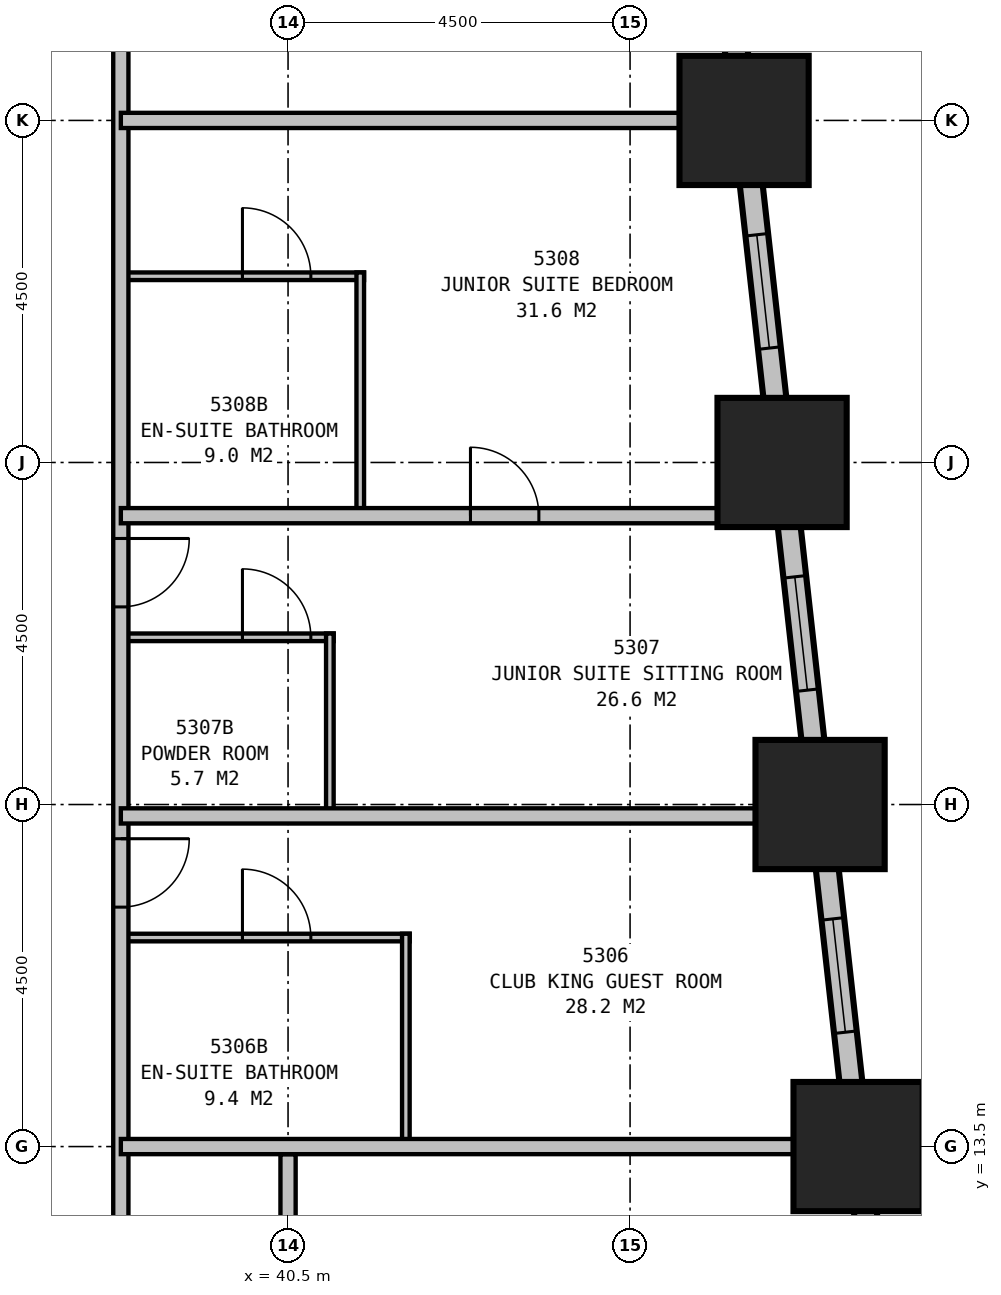
"""IFC4 building model, lengths in metres.
Left out: names, types, materials, properties, quantities, classifications, styles, units other than length and angle.
Written with IfcOpenShell. Run it as: python <this file> out.ifc"""

import sys

from ifc_helpers import new_model, si_unit, direction, frame, frame_2d, origin, origin_2d, place, context, subcontext, project, spatial, rectangle, extrude, element, fill, save


model = new_model("IFC4")
c1 = context("Model", 3, precision=1e-05, world=origin(), true_north=direction((0.0, 1.0)))
c2 = subcontext(c1, "Body", "Model", "MODEL_VIEW")
j1 = project(units=[si_unit("LENGTHUNIT", "METRE"), si_unit("PLANEANGLEUNIT", "RADIAN")], contexts=[c1])
p1 = place(None, origin())
s1 = spatial("IfcSite", under=j1, at=p1, CompositionType="ELEMENT")
p2 = place(p1, origin())
s2 = spatial("IfcBuilding", under=s1, at=p2, CompositionType="ELEMENT")
p3 = place(p2, frame((0.0, 0.0, 204.4)))
s3 = spatial("IfcBuildingStorey", under=s2, at=p3, CompositionType="ELEMENT", Elevation=204.4)
for number, where, z_axis, x_axis in (
    (1, (48.0, 13.5, 0.0), (0.0, 0.0, 1.0), (1.0, 0.0, 0.0)),
    (2, (47.5, 18.0, 0.0), (0.0, 0.0, 1.0), (1.0, 0.0, 0.0)),
    (3, (47.0, 22.5, 0.0), (0.0, 0.0, 1.0), (1.0, 0.0, 0.0)),
    (4, (46.5, 27.0, 0.0), (0.0, 0.0, 1.0), (1.0, 0.0, 0.0)),
):
    element("IfcColumn", number, at=place(p3, frame(where, z_axis=z_axis, x_axis=x_axis)), inside=s3, PredefinedType="COLUMN", context=c2, shape_type="SweptSolid", body=[
        extrude(rectangle(XDim=1.7, YDim=1.7, at=origin_2d()), origin(), (0.0, 0.0, 1.0), 3.5),
    ])
p4 = place(p3, frame((49.017, 4.351, 0.0), z_axis=(0.0, 0.0, 1.0), x_axis=(-0.110433201132, 0.993883548555, 0.0)))
e5 = element("IfcWall", 5, at=p4, inside=s3, PredefinedType="STANDARD", context=c2, shape_type="SweptSolid", body=[
    extrude(rectangle(XDim=31.994, YDim=0.3, at=frame_2d((15.997, 0.0))), origin(), (0.0, 0.0, 1.0), 2.25),
])
p5 = place(p4, frame((1.664, 0.0, 0.5)))
e6 = element("IfcOpeningElement", 6, at=p5, cuts=e5, PredefinedType="OPENING", context=c2, shape_type="SweptSolid", body=[
    extrude(rectangle(XDim=1.5, YDim=1.6, at=frame_2d((0.75, 0.8))), frame((0.0, 0.16, 0.0), z_axis=(0.0, -1.0, 0.0), x_axis=(1.0, 0.0, 0.0)), (0.0, 0.0, 1.0), 0.32),
])
p6 = place(p4, frame((6.192, 0.0, 0.5)))
e7 = element("IfcOpeningElement", 7, at=p6, cuts=e5, PredefinedType="OPENING", context=c2, shape_type="SweptSolid", body=[
    extrude(rectangle(XDim=1.5, YDim=1.6, at=frame_2d((0.75, 0.8))), frame((0.0, 0.16, 0.0), z_axis=(0.0, -1.0, 0.0), x_axis=(1.0, 0.0, 0.0)), (0.0, 0.0, 1.0), 0.32),
])
p7 = place(p4, frame((10.719, 0.0, 0.5)))
e8 = element("IfcOpeningElement", 8, at=p7, cuts=e5, PredefinedType="OPENING", context=c2, shape_type="SweptSolid", body=[
    extrude(rectangle(XDim=1.5, YDim=1.6, at=frame_2d((0.75, 0.8))), frame((0.0, 0.16, 0.0), z_axis=(0.0, -1.0, 0.0), x_axis=(1.0, 0.0, 0.0)), (0.0, 0.0, 1.0), 0.32),
])
p8 = place(p4, frame((15.247, 0.0, 0.5)))
e9 = element("IfcOpeningElement", 9, at=p8, cuts=e5, PredefinedType="OPENING", context=c2, shape_type="SweptSolid", body=[
    extrude(rectangle(XDim=1.5, YDim=1.6, at=frame_2d((0.75, 0.8))), frame((0.0, 0.16, 0.0), z_axis=(0.0, -1.0, 0.0), x_axis=(1.0, 0.0, 0.0)), (0.0, 0.0, 1.0), 0.32),
])
p9 = place(p4, frame((19.775, 0.0, 0.5)))
e10 = element("IfcOpeningElement", 10, at=p9, cuts=e5, PredefinedType="OPENING", context=c2, shape_type="SweptSolid", body=[
    extrude(rectangle(XDim=1.5, YDim=1.6, at=frame_2d((0.75, 0.8))), frame((0.0, 0.16, 0.0), z_axis=(0.0, -1.0, 0.0), x_axis=(1.0, 0.0, 0.0)), (0.0, 0.0, 1.0), 0.32),
])
p10 = place(p4, frame((24.302, 0.0, 0.5)))
e11 = element("IfcOpeningElement", 11, at=p10, cuts=e5, PredefinedType="OPENING", context=c2, shape_type="SweptSolid", body=[
    extrude(rectangle(XDim=1.5, YDim=1.6, at=frame_2d((0.75, 0.8))), frame((0.0, 0.16, 0.0), z_axis=(0.0, -1.0, 0.0), x_axis=(1.0, 0.0, 0.0)), (0.0, 0.0, 1.0), 0.32),
])
p11 = place(p4, frame((28.83, 0.0, 0.5)))
e12 = element("IfcOpeningElement", 12, at=p11, cuts=e5, PredefinedType="OPENING", context=c2, shape_type="SweptSolid", body=[
    extrude(rectangle(XDim=1.5, YDim=1.6, at=frame_2d((0.75, 0.8))), frame((0.0, 0.16, 0.0), z_axis=(0.0, -1.0, 0.0), x_axis=(1.0, 0.0, 0.0)), (0.0, 0.0, 1.0), 0.32),
])
p12 = place(p3, frame((38.3, 10.6, 0.0), z_axis=(0.0, 0.0, 1.0), x_axis=(0.0, 1.0, 0.0)))
e13 = element("IfcWall", 13, at=p12, inside=s3, PredefinedType="PARTITIONING", context=c2, shape_type="SweptSolid", body=[
    extrude(rectangle(XDim=18.7, YDim=0.2, at=frame_2d((9.35, 0.0))), origin(), (0.0, 0.0, 1.0), 3.25),
])
p13 = place(p12, frame((6.95, 0.0, 0.0), z_axis=(0.0, 0.0, 1.0), x_axis=(-1.0, 0.0, 0.0)))
e14 = element("IfcOpeningElement", 14, at=p13, cuts=e13, PredefinedType="OPENING", context=c2, shape_type="SweptSolid", body=[
    extrude(rectangle(XDim=0.9, YDim=2.1, at=frame_2d((0.45, 1.05))), frame((0.0, 0.11, 0.0), z_axis=(0.0, -1.0, 0.0), x_axis=(1.0, 0.0, 0.0)), (0.0, 0.0, 1.0), 0.22),
])
p14 = place(p12, frame((10.9, 0.0, 0.0), z_axis=(0.0, 0.0, 1.0), x_axis=(-1.0, 0.0, 0.0)))
e15 = element("IfcOpeningElement", 15, at=p14, cuts=e13, PredefinedType="OPENING", context=c2, shape_type="SweptSolid", body=[
    extrude(rectangle(XDim=0.9, YDim=2.1, at=frame_2d((0.45, 1.05))), frame((0.0, 0.11, 0.0), z_axis=(0.0, -1.0, 0.0), x_axis=(1.0, 0.0, 0.0)), (0.0, 0.0, 1.0), 0.22),
])
p15 = place(p3, frame((38.3, 17.85, 0.0), z_axis=(0.0, 0.0, 1.0), x_axis=(1.0, 0.0, 0.0)))
e16 = element("IfcWall", 16, at=p15, inside=s3, PredefinedType="PARTITIONING", context=c2, shape_type="SweptSolid", body=[
    extrude(rectangle(XDim=9.216, YDim=0.2, at=frame_2d((4.608, 0.0))), origin(), (0.0, 0.0, 1.0), 2.25),
])
p16 = place(p3, frame((38.3, 21.8, 0.0), z_axis=(0.0, 0.0, 1.0), x_axis=(1.0, 0.0, 0.0)))
e17 = element("IfcWall", 17, at=p16, inside=s3, PredefinedType="PARTITIONING", context=c2, shape_type="SweptSolid", body=[
    extrude(rectangle(XDim=8.777, YDim=0.2, at=frame_2d((4.388, 0.0))), origin(), (0.0, 0.0, 1.0), 3.25),
])
p17 = place(p16, frame((4.6, 0.0, 0.0)))
e18 = element("IfcOpeningElement", 18, at=p17, cuts=e17, PredefinedType="OPENING", context=c2, shape_type="SweptSolid", body=[
    extrude(rectangle(XDim=0.9, YDim=2.1, at=frame_2d((0.45, 1.05))), frame((0.0, 0.11, 0.0), z_axis=(0.0, -1.0, 0.0), x_axis=(1.0, 0.0, 0.0)), (0.0, 0.0, 1.0), 0.22),
])
p18 = place(p3, frame((42.05, 13.5, 0.0), z_axis=(0.0, 0.0, 1.0), x_axis=(0.0, 1.0, 0.0)))
e19 = element("IfcWall", 19, at=p18, inside=s3, PredefinedType="PLUMBINGWALL", context=c2, shape_type="SweptSolid", body=[
    extrude(rectangle(XDim=2.8, YDim=0.1, at=frame_2d((1.4, 0.0))), origin(), (0.0, 0.0, 1.0), 3.25),
])
p19 = place(p3, frame((38.3, 16.25, 0.0), z_axis=(0.0, 0.0, 1.0), x_axis=(1.0, 0.0, 0.0)))
e20 = element("IfcWall", 20, at=p19, inside=s3, PredefinedType="PLUMBINGWALL", context=c2, shape_type="SweptSolid", body=[
    extrude(rectangle(XDim=3.8, YDim=0.1, at=frame_2d((1.9, 0.0))), origin(), (0.0, 0.0, 1.0), 3.25),
])
p20 = place(p19, frame((1.6, 0.0, 0.0)))
e21 = element("IfcOpeningElement", 21, at=p20, cuts=e20, PredefinedType="OPENING", context=c2, shape_type="SweptSolid", body=[
    extrude(rectangle(XDim=0.9, YDim=2.1, at=frame_2d((0.45, 1.05))), frame((0.0, 0.06, 0.0), z_axis=(0.0, -1.0, 0.0), x_axis=(1.0, 0.0, 0.0)), (0.0, 0.0, 1.0), 0.12),
])
p21 = place(p3, frame((41.05, 17.85, 0.0), z_axis=(0.0, 0.0, 1.0), x_axis=(0.0, 1.0, 0.0)))
e22 = element("IfcWall", 22, at=p21, inside=s3, PredefinedType="PLUMBINGWALL", context=c2, shape_type="SweptSolid", body=[
    extrude(rectangle(XDim=2.4, YDim=0.1, at=frame_2d((1.2, 0.0))), origin(), (0.0, 0.0, 1.0), 3.25),
])
p22 = place(p3, frame((38.3, 20.2, 0.0), z_axis=(0.0, 0.0, 1.0), x_axis=(1.0, 0.0, 0.0)))
e23 = element("IfcWall", 23, at=p22, inside=s3, PredefinedType="PLUMBINGWALL", context=c2, shape_type="SweptSolid", body=[
    extrude(rectangle(XDim=2.8, YDim=0.1, at=frame_2d((1.4, 0.0))), origin(), (0.0, 0.0, 1.0), 3.25),
])
p23 = place(p22, frame((1.6, 0.0, 0.0)))
e24 = element("IfcOpeningElement", 24, at=p23, cuts=e23, PredefinedType="OPENING", context=c2, shape_type="SweptSolid", body=[
    extrude(rectangle(XDim=0.9, YDim=2.1, at=frame_2d((0.45, 1.05))), frame((0.0, 0.06, 0.0), z_axis=(0.0, -1.0, 0.0), x_axis=(1.0, 0.0, 0.0)), (0.0, 0.0, 1.0), 0.12),
])
p24 = place(p3, frame((41.45, 21.8, 0.0), z_axis=(0.0, 0.0, 1.0), x_axis=(0.0, 1.0, 0.0)))
e25 = element("IfcWall", 25, at=p24, inside=s3, PredefinedType="PLUMBINGWALL", context=c2, shape_type="SweptSolid", body=[
    extrude(rectangle(XDim=3.2, YDim=0.1, at=frame_2d((1.6, 0.0))), origin(), (0.0, 0.0, 1.0), 3.25),
])
p25 = place(p3, frame((38.3, 24.95, 0.0), z_axis=(0.0, 0.0, 1.0), x_axis=(1.0, 0.0, 0.0)))
e26 = element("IfcWall", 26, at=p25, inside=s3, PredefinedType="PLUMBINGWALL", context=c2, shape_type="SweptSolid", body=[
    extrude(rectangle(XDim=3.2, YDim=0.1, at=frame_2d((1.6, 0.0))), origin(), (0.0, 0.0, 1.0), 3.25),
])
p26 = place(p25, frame((1.6, 0.0, 0.0)))
e27 = element("IfcOpeningElement", 27, at=p26, cuts=e26, PredefinedType="OPENING", context=c2, shape_type="SweptSolid", body=[
    extrude(rectangle(XDim=0.9, YDim=2.1, at=frame_2d((0.45, 1.05))), frame((0.0, 0.06, 0.0), z_axis=(0.0, -1.0, 0.0), x_axis=(1.0, 0.0, 0.0)), (0.0, 0.0, 1.0), 0.12),
])
p27 = place(p3, frame((38.3, 13.5, 0.0), z_axis=(0.0, 0.0, 1.0), x_axis=(1.0, 0.0, 0.0)))
e28 = element("IfcWall", 28, at=p27, inside=s3, PredefinedType="PARTITIONING", context=c2, shape_type="SweptSolid", body=[
    extrude(rectangle(XDim=9.921, YDim=0.2, at=frame_2d((4.96, 0.0))), origin(), (0.0, 0.0, 1.0), 1.95),
])
p28 = place(p3, frame((40.5, 4.6, 0.0), z_axis=(0.0, 0.0, 1.0), x_axis=(0.0, 1.0, 0.0)))
e29 = element("IfcWall", 29, at=p28, inside=s3, PredefinedType="PARTITIONING", context=c2, shape_type="SweptSolid", body=[
    extrude(rectangle(XDim=8.8, YDim=0.2, at=frame_2d((4.4, 0.0))), origin(), (0.0, 0.0, 1.0), 2.25),
])
p29 = place(p28, frame((4.05, 0.0, 0.0)))
e30 = element("IfcOpeningElement", 30, at=p29, cuts=e29, PredefinedType="OPENING", context=c2, shape_type="SweptSolid", body=[
    extrude(rectangle(XDim=0.9, YDim=2.1, at=frame_2d((0.45, 1.05))), frame((0.0, 0.11, 0.0), z_axis=(0.0, -1.0, 0.0), x_axis=(1.0, 0.0, 0.0)), (0.0, 0.0, 1.0), 0.22),
])
p30 = place(p3, frame((38.3, 27.0, 0.0), z_axis=(0.0, 0.0, 1.0), x_axis=(1.0, 0.0, 0.0)))
e31 = element("IfcWall", 31, at=p30, inside=s3, PredefinedType="PARTITIONING", context=c2, shape_type="SweptSolid", body=[
    extrude(rectangle(XDim=7.977, YDim=0.2, at=frame_2d((3.988, 0.0))), origin(), (0.0, 0.0, 1.0), 1.95),
])
p31 = place(p7, origin())
e32 = element("IfcWindow", 32, at=p31, inside=s3, PartitioningType="SINGLE_PANEL", PredefinedType="WINDOW", context=c2, shape_type="SweptSolid", body=[
    extrude(rectangle(XDim=1.5, YDim=1.6, at=frame_2d((0.75, 0.8))), frame((0.0, 0.03, 0.0), z_axis=(0.0, -1.0, 0.0), x_axis=(1.0, 0.0, 0.0)), (0.0, 0.0, 1.0), 0.06),
])
fill(e8, e32)
p32 = place(p8, origin())
e33 = element("IfcWindow", 33, at=p32, inside=s3, PartitioningType="SINGLE_PANEL", PredefinedType="WINDOW", context=c2, shape_type="SweptSolid", body=[
    extrude(rectangle(XDim=1.5, YDim=1.6, at=frame_2d((0.75, 0.8))), frame((0.0, 0.03, 0.0), z_axis=(0.0, -1.0, 0.0), x_axis=(1.0, 0.0, 0.0)), (0.0, 0.0, 1.0), 0.06),
])
fill(e9, e33)
p33 = place(p9, origin())
e34 = element("IfcWindow", 34, at=p33, inside=s3, PartitioningType="SINGLE_PANEL", PredefinedType="WINDOW", context=c2, shape_type="SweptSolid", body=[
    extrude(rectangle(XDim=1.5, YDim=1.6, at=frame_2d((0.75, 0.8))), frame((0.0, 0.03, 0.0), z_axis=(0.0, -1.0, 0.0), x_axis=(1.0, 0.0, 0.0)), (0.0, 0.0, 1.0), 0.06),
])
fill(e10, e34)
p34 = place(p13, origin())
e35 = element("IfcDoor", 35, at=p34, inside=s3, OperationType="SINGLE_SWING_LEFT", PredefinedType="DOOR", context=c2, shape_type="SweptSolid", body=[
    extrude(rectangle(XDim=0.9, YDim=2.1, at=frame_2d((0.45, 1.05))), frame((0.0, 0.025, 0.0), z_axis=(0.0, -1.0, 0.0), x_axis=(1.0, 0.0, 0.0)), (0.0, 0.0, 1.0), 0.05),
])
fill(e14, e35)
p35 = place(p14, origin())
e36 = element("IfcDoor", 36, at=p35, inside=s3, OperationType="SINGLE_SWING_LEFT", PredefinedType="DOOR", context=c2, shape_type="SweptSolid", body=[
    extrude(rectangle(XDim=0.9, YDim=2.1, at=frame_2d((0.45, 1.05))), frame((0.0, 0.025, 0.0), z_axis=(0.0, -1.0, 0.0), x_axis=(1.0, 0.0, 0.0)), (0.0, 0.0, 1.0), 0.05),
])
fill(e15, e36)
p36 = place(p17, origin())
e37 = element("IfcDoor", 37, at=p36, inside=s3, OperationType="SINGLE_SWING_LEFT", PredefinedType="DOOR", context=c2, shape_type="SweptSolid", body=[
    extrude(rectangle(XDim=0.9, YDim=2.1, at=frame_2d((0.45, 1.05))), frame((0.0, 0.025, 0.0), z_axis=(0.0, -1.0, 0.0), x_axis=(1.0, 0.0, 0.0)), (0.0, 0.0, 1.0), 0.05),
])
fill(e18, e37)
p37 = place(p20, origin())
e38 = element("IfcDoor", 38, at=p37, inside=s3, OperationType="SINGLE_SWING_LEFT", PredefinedType="DOOR", context=c2, shape_type="SweptSolid", body=[
    extrude(rectangle(XDim=0.9, YDim=2.1, at=frame_2d((0.45, 1.05))), frame((0.0, 0.025, 0.0), z_axis=(0.0, -1.0, 0.0), x_axis=(1.0, 0.0, 0.0)), (0.0, 0.0, 1.0), 0.05),
])
fill(e21, e38)
p38 = place(p23, origin())
e39 = element("IfcDoor", 39, at=p38, inside=s3, OperationType="SINGLE_SWING_LEFT", PredefinedType="DOOR", context=c2, shape_type="SweptSolid", body=[
    extrude(rectangle(XDim=0.9, YDim=2.1, at=frame_2d((0.45, 1.05))), frame((0.0, 0.025, 0.0), z_axis=(0.0, -1.0, 0.0), x_axis=(1.0, 0.0, 0.0)), (0.0, 0.0, 1.0), 0.05),
])
fill(e24, e39)
p39 = place(p26, origin())
e40 = element("IfcDoor", 40, at=p39, inside=s3, OperationType="SINGLE_SWING_LEFT", PredefinedType="DOOR", context=c2, shape_type="SweptSolid", body=[
    extrude(rectangle(XDim=0.9, YDim=2.1, at=frame_2d((0.45, 1.05))), frame((0.0, 0.025, 0.0), z_axis=(0.0, -1.0, 0.0), x_axis=(1.0, 0.0, 0.0)), (0.0, 0.0, 1.0), 0.05),
])
fill(e27, e40)
save(model, sys.argv[1])
